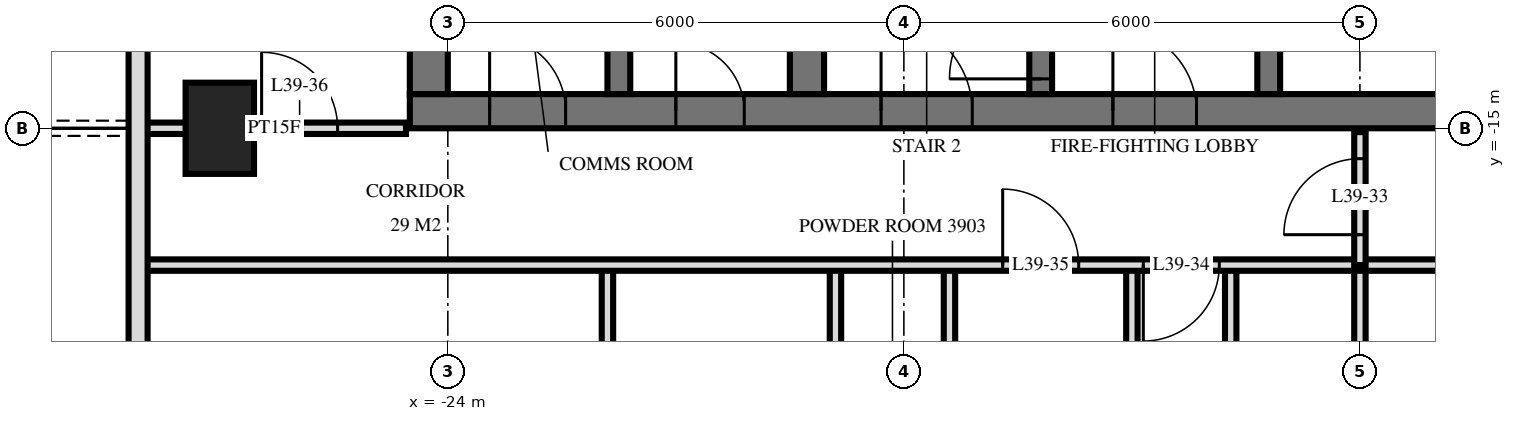
"""IFC4 building model, lengths in metres.
Left out: names, types, materials, properties, quantities, classifications, styles, units other than length and angle.
Written with IfcOpenShell. Run it as: python <this file> out.ifc"""

import sys

from ifc_helpers import new_model, si_unit, direction, frame, frame_2d, origin, origin_2d, place, context, subcontext, project, spatial, rectangle, extrude, element, fill, save


model = new_model("IFC4")
c1 = context("Model", 3, precision=1e-05, world=origin(), true_north=direction((0.0, 1.0)))
c2 = subcontext(c1, "Body", "Model", "MODEL_VIEW")
j1 = project(units=[si_unit("LENGTHUNIT", "METRE"), si_unit("PLANEANGLEUNIT", "RADIAN")], contexts=[c1])
p1 = place(None, origin())
s1 = spatial("IfcSite", under=j1, at=p1, CompositionType="ELEMENT")
p2 = place(p1, origin())
s2 = spatial("IfcBuilding", under=s1, at=p2, CompositionType="ELEMENT")
p3 = place(p2, frame((0.0, 0.0, 152.4)))
s3 = spatial("IfcBuildingStorey", under=s2, at=p3, CompositionType="ELEMENT", Elevation=152.4)
p4 = place(p3, frame((-27.0, -15.0, 0.0), z_axis=(0.0, 0.0, 1.0), x_axis=(0.0, 1.0, 0.0)))
e1 = element("IfcColumn", 1, at=p4, inside=s3, PredefinedType="COLUMN", context=c2, shape_type="SweptSolid", body=[
    extrude(rectangle(XDim=1.2, YDim=0.9, at=origin_2d()), origin(), (0.0, 0.0, 1.0), 3.6),
])
p5 = place(p3, frame((-24.5, -14.775, 0.0), z_axis=(0.0, 0.0, 1.0), x_axis=(1.0, 0.0, 0.0)))
e2 = element("IfcWall", 2, at=p5, inside=s3, PredefinedType="SHEAR", context=c2, shape_type="SweptSolid", body=[
    extrude(rectangle(XDim=14.5, YDim=0.45, at=frame_2d((7.25, 0.0))), origin(), (0.0, 0.0, 1.0), 3.6),
])
p6 = place(p5, frame((6.2, 0.0, 0.0)))
e3 = element("IfcOpeningElement", 3, at=p6, cuts=e2, PredefinedType="OPENING", context=c2, shape_type="SweptSolid", body=[
    extrude(rectangle(XDim=1.2, YDim=2.1, at=frame_2d((0.6, 1.05))), frame((0.0, 0.235, 0.0), z_axis=(0.0, -1.0, 0.0), x_axis=(1.0, 0.0, 0.0)), (0.0, 0.0, 1.0), 0.47),
])
p7 = place(p5, frame((9.25, 0.0, 0.0)))
e4 = element("IfcOpeningElement", 4, at=p7, cuts=e2, PredefinedType="OPENING", context=c2, shape_type="SweptSolid", body=[
    extrude(rectangle(XDim=1.1, YDim=2.1, at=frame_2d((0.55, 1.05))), frame((0.0, 0.235, 0.0), z_axis=(0.0, -1.0, 0.0), x_axis=(1.0, 0.0, 0.0)), (0.0, 0.0, 1.0), 0.47),
])
p8 = place(p5, frame((3.5, 0.0, 0.0)))
e5 = element("IfcOpeningElement", 5, at=p8, cuts=e2, PredefinedType="OPENING", context=c2, shape_type="SweptSolid", body=[
    extrude(rectangle(XDim=0.9, YDim=2.1, at=frame_2d((0.45, 1.05))), frame((0.0, 0.235, 0.0), z_axis=(0.0, -1.0, 0.0), x_axis=(1.0, 0.0, 0.0)), (0.0, 0.0, 1.0), 0.47),
])
p9 = place(p5, frame((1.05, 0.0, 0.0)))
e6 = element("IfcOpeningElement", 6, at=p9, cuts=e2, PredefinedType="OPENING", context=c2, shape_type="SweptSolid", body=[
    extrude(rectangle(XDim=1.0, YDim=2.1, at=frame_2d((0.5, 1.05))), frame((0.0, 0.235, 0.0), z_axis=(0.0, -1.0, 0.0), x_axis=(1.0, 0.0, 0.0)), (0.0, 0.0, 1.0), 0.47),
])
p10 = place(p3, frame((-24.25, -14.55, 0.0), z_axis=(0.0, 0.0, 1.0), x_axis=(0.0, 1.0, 0.0)))
e7 = element("IfcWall", 7, at=p10, inside=s3, PredefinedType="SHEAR", context=c2, shape_type="SweptSolid", body=[
    extrude(rectangle(XDim=14.1, YDim=0.5, at=frame_2d((7.05, 0.0))), origin(), (0.0, 0.0, 1.0), 3.6),
])
p11 = place(p3, frame((-13.2, -14.55, 0.0), z_axis=(0.0, 0.0, 1.0), x_axis=(0.0, 1.0, 0.0)))
e8 = element("IfcWall", 8, at=p11, inside=s3, PredefinedType="SHEAR", context=c2, shape_type="SweptSolid", body=[
    extrude(rectangle(XDim=5.4, YDim=0.3, at=frame_2d((2.7, 0.0))), origin(), (0.0, 0.0, 1.0), 3.6),
])
p12 = place(p11, frame((4.0, 0.0, 0.0)))
e9 = element("IfcOpeningElement", 9, at=p12, cuts=e8, PredefinedType="OPENING", context=c2, shape_type="SweptSolid", body=[
    extrude(rectangle(XDim=1.2, YDim=2.1, at=frame_2d((0.6, 1.05))), frame((0.0, 0.16, 0.0), z_axis=(0.0, -1.0, 0.0), x_axis=(1.0, 0.0, 0.0)), (0.0, 0.0, 1.0), 0.32),
])
p13 = place(p3, frame((-16.2, -14.55, 0.0), z_axis=(0.0, 0.0, 1.0), x_axis=(0.0, 1.0, 0.0)))
e10 = element("IfcWall", 10, at=p13, inside=s3, PredefinedType="SHEAR", context=c2, shape_type="SweptSolid", body=[
    extrude(rectangle(XDim=5.4, YDim=0.3, at=frame_2d((2.7, 0.0))), origin(), (0.0, 0.0, 1.0), 3.6),
])
p14 = place(p13, frame((0.2, 0.0, 0.0)))
e11 = element("IfcOpeningElement", 11, at=p14, cuts=e10, PredefinedType="OPENING", context=c2, shape_type="SweptSolid", body=[
    extrude(rectangle(XDim=1.2, YDim=2.1, at=frame_2d((0.6, 1.05))), frame((0.0, 0.16, 0.0), z_axis=(0.0, -1.0, 0.0), x_axis=(1.0, 0.0, 0.0)), (0.0, 0.0, 1.0), 0.32),
])
p15 = place(p3, frame((-19.275, -14.55, 0.0), z_axis=(0.0, 0.0, 1.0), x_axis=(0.0, 1.0, 0.0)))
e12 = element("IfcWall", 12, at=p15, inside=s3, PredefinedType="SHEAR", context=c2, shape_type="SweptSolid", body=[
    extrude(rectangle(XDim=5.4, YDim=0.45, at=frame_2d((2.7, 0.0))), origin(), (0.0, 0.0, 1.0), 3.6),
])
p16 = place(p3, frame((-21.75, -14.55, 0.0), z_axis=(0.0, 0.0, 1.0), x_axis=(0.0, 1.0, 0.0)))
e13 = element("IfcWall", 13, at=p16, inside=s3, PredefinedType="SHEAR", context=c2, shape_type="SweptSolid", body=[
    extrude(rectangle(XDim=5.4, YDim=0.3, at=frame_2d((2.7, 0.0))), origin(), (0.0, 0.0, 1.0), 3.6),
])
p17 = place(p3, frame((-28.075, -3.325, 0.0), z_axis=(0.0, 0.0, 1.0), x_axis=(0.0, -1.0, 0.0)))
e14 = element("IfcWall", 14, at=p17, inside=s3, PredefinedType="SOLIDWALL", context=c2, shape_type="SweptSolid", body=[
    extrude(rectangle(XDim=25.951, YDim=0.25, at=frame_2d((12.975, 0.0))), origin(), (0.0, 0.0, 1.0), 3.32),
])
p18 = place(p17, frame((7.275, 0.0, 0.0)))
e15 = element("IfcOpeningElement", 15, at=p18, cuts=e14, PredefinedType="OPENING", context=c2, shape_type="SweptSolid", body=[
    extrude(rectangle(XDim=1.8, YDim=2.4, at=frame_2d((0.9, 1.2))), frame((0.0, 0.135, 0.0), z_axis=(0.0, -1.0, 0.0), x_axis=(1.0, 0.0, 0.0)), (0.0, 0.0, 1.0), 0.27),
])
p19 = place(p17, frame((18.175, 0.0, 0.0)))
e16 = element("IfcOpeningElement", 16, at=p19, cuts=e14, PredefinedType="OPENING", context=c2, shape_type="SweptSolid", body=[
    extrude(rectangle(XDim=1.8, YDim=2.4, at=frame_2d((0.9, 1.2))), frame((0.0, 0.135, 0.0), z_axis=(0.0, -1.0, 0.0), x_axis=(1.0, 0.0, 0.0)), (0.0, 0.0, 1.0), 0.27),
])
p20 = place(p17, frame((21.075, 0.0, 0.0)))
e17 = element("IfcOpeningElement", 17, at=p20, cuts=e14, PredefinedType="OPENING", context=c2, shape_type="SweptSolid", body=[
    extrude(rectangle(XDim=1.8, YDim=2.4, at=frame_2d((0.9, 1.2))), frame((0.0, 0.135, 0.0), z_axis=(0.0, -1.0, 0.0), x_axis=(1.0, 0.0, 0.0)), (0.0, 0.0, 1.0), 0.27),
])
p21 = place(p17, frame((23.825, 0.0, 0.3)))
e18 = element("IfcOpeningElement", 18, at=p21, cuts=e14, PredefinedType="OPENING", context=c2, shape_type="SweptSolid", body=[
    extrude(rectangle(XDim=1.8, YDim=2.1, at=frame_2d((0.9, 1.05))), frame((0.0, 0.135, 0.0), z_axis=(0.0, -1.0, 0.0), x_axis=(1.0, 0.0, 0.0)), (0.0, 0.0, 1.0), 0.27),
])
p22 = place(p3, frame((-12.0, -16.8, 0.0), z_axis=(0.0, 0.0, 1.0), x_axis=(0.0, 1.0, 0.0)))
e19 = element("IfcWall", 19, at=p22, inside=s3, PredefinedType="PARTITIONING", context=c2, shape_type="SweptSolid", body=[
    extrude(rectangle(XDim=1.75, YDim=0.15, at=frame_2d((0.875, 0.0))), origin(), (0.0, 0.0, 1.0), 3.32),
])
p23 = place(p22, frame((0.4, 0.0, 0.0)))
e20 = element("IfcOpeningElement", 20, at=p23, cuts=e19, PredefinedType="OPENING", context=c2, shape_type="SweptSolid", body=[
    extrude(rectangle(XDim=1.0, YDim=2.1, at=frame_2d((0.5, 1.05))), frame((0.0, 0.085, 0.0), z_axis=(0.0, -1.0, 0.0), x_axis=(1.0, 0.0, 0.0)), (0.0, 0.0, 1.0), 0.17),
])
p24 = place(p3, frame((-12.0, -33.62, 0.0), z_axis=(0.0, 0.0, 1.0), x_axis=(0.0, 1.0, 0.0)))
e21 = element("IfcWall", 21, at=p24, inside=s3, PredefinedType="PARTITIONING", context=c2, shape_type="SweptSolid", body=[
    extrude(rectangle(XDim=16.82, YDim=0.15, at=frame_2d((8.41, 0.0))), origin(), (0.0, 0.0, 1.0), 3.32),
])
p25 = place(p3, frame((-13.7, -21.8, 0.0), z_axis=(0.0, 0.0, 1.0), x_axis=(0.0, 1.0, 0.0)))
e22 = element("IfcWall", 22, at=p25, inside=s3, PredefinedType="PARTITIONING", context=c2, shape_type="SweptSolid", body=[
    extrude(rectangle(XDim=5.0, YDim=0.15, at=frame_2d((2.5, 0.0))), origin(), (0.0, 0.0, 1.0), 3.32),
])
p26 = place(p25, frame((2.1, 0.0, 0.0)))
e23 = element("IfcOpeningElement", 23, at=p26, cuts=e22, PredefinedType="OPENING", context=c2, shape_type="SweptSolid", body=[
    extrude(rectangle(XDim=0.8, YDim=2.1, at=frame_2d((0.4, 1.05))), frame((0.0, 0.085, 0.0), z_axis=(0.0, -1.0, 0.0), x_axis=(1.0, 0.0, 0.0)), (0.0, 0.0, 1.0), 0.17),
])
p27 = place(p3, frame((-15.0, -21.0, 0.0), z_axis=(0.0, 0.0, 1.0), x_axis=(0.0, 1.0, 0.0)))
e24 = element("IfcWall", 24, at=p27, inside=s3, PredefinedType="PARTITIONING", context=c2, shape_type="SweptSolid", body=[
    extrude(rectangle(XDim=4.2, YDim=0.15, at=frame_2d((2.1, 0.0))), origin(), (0.0, 0.0, 1.0), 3.32),
])
p28 = place(p3, frame((-17.4, -21.0, 0.0), z_axis=(0.0, 0.0, 1.0), x_axis=(0.0, 1.0, 0.0)))
e25 = element("IfcWall", 25, at=p28, inside=s3, PredefinedType="PARTITIONING", context=c2, shape_type="SweptSolid", body=[
    extrude(rectangle(XDim=4.2, YDim=0.15, at=frame_2d((2.1, 0.0))), origin(), (0.0, 0.0, 1.0), 3.32),
])
p29 = place(p28, frame((1.6, 0.0, 0.0)))
e26 = element("IfcOpeningElement", 26, at=p29, cuts=e25, PredefinedType="OPENING", context=c2, shape_type="SweptSolid", body=[
    extrude(rectangle(XDim=1.0, YDim=2.1, at=frame_2d((0.5, 1.05))), frame((0.0, 0.085, 0.0), z_axis=(0.0, -1.0, 0.0), x_axis=(1.0, 0.0, 0.0)), (0.0, 0.0, 1.0), 0.17),
])
p30 = place(p3, frame((-18.9, -21.0, 0.0), z_axis=(0.0, 0.0, 1.0), x_axis=(0.0, 1.0, 0.0)))
e27 = element("IfcWall", 27, at=p30, inside=s3, PredefinedType="PLUMBINGWALL", context=c2, shape_type="SweptSolid", body=[
    extrude(rectangle(XDim=4.2, YDim=0.15, at=frame_2d((2.1, 0.0))), origin(), (0.0, 0.0, 1.0), 3.32),
])
p31 = place(p3, frame((-21.9, -21.0, 0.0), z_axis=(0.0, 0.0, 1.0), x_axis=(0.0, 1.0, 0.0)))
e28 = element("IfcWall", 28, at=p31, inside=s3, PredefinedType="PARTITIONING", context=c2, shape_type="SweptSolid", body=[
    extrude(rectangle(XDim=4.2, YDim=0.15, at=frame_2d((2.1, 0.0))), origin(), (0.0, 0.0, 1.0), 3.32),
])
p32 = place(p3, frame((-28.02, -16.8, 0.0), z_axis=(0.0, 0.0, 1.0), x_axis=(1.0, 0.0, 0.0)))
e29 = element("IfcWall", 29, at=p32, inside=s3, PredefinedType="PARTITIONING", context=c2, shape_type="SweptSolid", body=[
    extrude(rectangle(XDim=56.04, YDim=0.15, at=frame_2d((28.02, 0.0))), origin(), (0.0, 0.0, 1.0), 3.32),
])
p33 = place(p32, frame((13.17, 0.0, 0.0)))
e30 = element("IfcOpeningElement", 30, at=p33, cuts=e29, PredefinedType="OPENING", context=c2, shape_type="SweptSolid", body=[
    extrude(rectangle(XDim=1.0, YDim=2.1, at=frame_2d((0.5, 1.05))), frame((0.0, 0.085, 0.0), z_axis=(0.0, -1.0, 0.0), x_axis=(1.0, 0.0, 0.0)), (0.0, 0.0, 1.0), 0.17),
])
p34 = place(p32, frame((11.32, 0.0, 0.0)))
e31 = element("IfcOpeningElement", 31, at=p34, cuts=e29, PredefinedType="OPENING", context=c2, shape_type="SweptSolid", body=[
    extrude(rectangle(XDim=1.0, YDim=2.1, at=frame_2d((0.5, 1.05))), frame((0.0, 0.085, 0.0), z_axis=(0.0, -1.0, 0.0), x_axis=(1.0, 0.0, 0.0)), (0.0, 0.0, 1.0), 0.17),
])
p35 = place(p32, frame((41.87, 0.0, 0.0)))
e32 = element("IfcOpeningElement", 32, at=p35, cuts=e29, PredefinedType="OPENING", context=c2, shape_type="SweptSolid", body=[
    extrude(rectangle(XDim=1.0, YDim=2.1, at=frame_2d((0.5, 1.05))), frame((0.0, 0.085, 0.0), z_axis=(0.0, -1.0, 0.0), x_axis=(1.0, 0.0, 0.0)), (0.0, 0.0, 1.0), 0.17),
])
p36 = place(p32, frame((43.72, 0.0, 0.0)))
e33 = element("IfcOpeningElement", 33, at=p36, cuts=e29, PredefinedType="OPENING", context=c2, shape_type="SweptSolid", body=[
    extrude(rectangle(XDim=1.0, YDim=2.1, at=frame_2d((0.5, 1.05))), frame((0.0, 0.085, 0.0), z_axis=(0.0, -1.0, 0.0), x_axis=(1.0, 0.0, 0.0)), (0.0, 0.0, 1.0), 0.17),
])
p37 = place(p32, frame((19.52, 0.0, 0.0)))
e34 = element("IfcOpeningElement", 34, at=p37, cuts=e29, PredefinedType="OPENING", context=c2, shape_type="SweptSolid", body=[
    extrude(rectangle(XDim=1.0, YDim=2.1, at=frame_2d((0.5, 1.05))), frame((0.0, 0.085, 0.0), z_axis=(0.0, -1.0, 0.0), x_axis=(1.0, 0.0, 0.0)), (0.0, 0.0, 1.0), 0.17),
])
p38 = place(p32, frame((27.52, 0.0, 0.0)))
e35 = element("IfcOpeningElement", 35, at=p38, cuts=e29, PredefinedType="OPENING", context=c2, shape_type="SweptSolid", body=[
    extrude(rectangle(XDim=1.0, YDim=2.1, at=frame_2d((0.5, 1.05))), frame((0.0, 0.085, 0.0), z_axis=(0.0, -1.0, 0.0), x_axis=(1.0, 0.0, 0.0)), (0.0, 0.0, 1.0), 0.17),
])
p39 = place(p32, frame((35.52, 0.0, 0.0)))
e36 = element("IfcOpeningElement", 36, at=p39, cuts=e29, PredefinedType="OPENING", context=c2, shape_type="SweptSolid", body=[
    extrude(rectangle(XDim=1.0, YDim=2.1, at=frame_2d((0.5, 1.05))), frame((0.0, 0.085, 0.0), z_axis=(0.0, -1.0, 0.0), x_axis=(1.0, 0.0, 0.0)), (0.0, 0.0, 1.0), 0.17),
])
p40 = place(p3, frame((-28.02, -15.0, 0.0), z_axis=(0.0, 0.0, 1.0), x_axis=(1.0, 0.0, 0.0)))
e37 = element("IfcWall", 37, at=p40, inside=s3, PredefinedType="PARTITIONING", context=c2, shape_type="SweptSolid", body=[
    extrude(rectangle(XDim=3.47, YDim=0.15, at=frame_2d((1.735, 0.0))), origin(), (0.0, 0.0, 1.0), 3.32),
])
p41 = place(p40, frame((1.57, 0.0, 0.0)))
e38 = element("IfcOpeningElement", 38, at=p41, cuts=e37, PredefinedType="OPENING", context=c2, shape_type="SweptSolid", body=[
    extrude(rectangle(XDim=1.0, YDim=2.1, at=frame_2d((0.5, 1.05))), frame((0.0, 0.085, 0.0), z_axis=(0.0, -1.0, 0.0), x_axis=(1.0, 0.0, 0.0)), (0.0, 0.0, 1.0), 0.17),
])
p42 = place(p6, origin())
e39 = element("IfcDoor", 39, at=p42, inside=s3, OperationType="SINGLE_SWING_RIGHT", PredefinedType="DOOR", context=c2, shape_type="SweptSolid", body=[
    extrude(rectangle(XDim=1.2, YDim=2.1, at=frame_2d((0.6, 1.05))), frame((0.0, 0.025, 0.0), z_axis=(0.0, -1.0, 0.0), x_axis=(1.0, 0.0, 0.0)), (0.0, 0.0, 1.0), 0.05),
])
fill(e3, e39)
p43 = place(p7, origin())
e40 = element("IfcDoor", 40, at=p43, inside=s3, OperationType="SINGLE_SWING_RIGHT", PredefinedType="DOOR", context=c2, shape_type="SweptSolid", body=[
    extrude(rectangle(XDim=1.1, YDim=2.1, at=frame_2d((0.55, 1.05))), frame((0.0, 0.025, 0.0), z_axis=(0.0, -1.0, 0.0), x_axis=(1.0, 0.0, 0.0)), (0.0, 0.0, 1.0), 0.05),
])
fill(e4, e40)
p44 = place(p8, origin())
e41 = element("IfcDoor", 41, at=p44, inside=s3, OperationType="SINGLE_SWING_RIGHT", PredefinedType="DOOR", context=c2, shape_type="SweptSolid", body=[
    extrude(rectangle(XDim=0.9, YDim=2.1, at=frame_2d((0.45, 1.05))), frame((0.0, 0.025, 0.0), z_axis=(0.0, -1.0, 0.0), x_axis=(1.0, 0.0, 0.0)), (0.0, 0.0, 1.0), 0.05),
])
fill(e5, e41)
p45 = place(p9, origin())
e42 = element("IfcDoor", 42, at=p45, inside=s3, OperationType="SINGLE_SWING_RIGHT", PredefinedType="DOOR", context=c2, shape_type="SweptSolid", body=[
    extrude(rectangle(XDim=1.0, YDim=2.1, at=frame_2d((0.5, 1.05))), frame((0.0, 0.025, 0.0), z_axis=(0.0, -1.0, 0.0), x_axis=(1.0, 0.0, 0.0)), (0.0, 0.0, 1.0), 0.05),
])
fill(e6, e42)
p46 = place(p14, origin())
e43 = element("IfcDoor", 43, at=p46, inside=s3, OperationType="SINGLE_SWING_RIGHT", PredefinedType="DOOR", context=c2, shape_type="SweptSolid", body=[
    extrude(rectangle(XDim=1.2, YDim=2.1, at=frame_2d((0.6, 1.05))), frame((0.0, 0.025, 0.0), z_axis=(0.0, -1.0, 0.0), x_axis=(1.0, 0.0, 0.0)), (0.0, 0.0, 1.0), 0.05),
])
fill(e11, e43)
p47 = place(p23, origin())
e44 = element("IfcDoor", 44, at=p47, inside=s3, OperationType="SINGLE_SWING_RIGHT", PredefinedType="DOOR", context=c2, shape_type="SweptSolid", body=[
    extrude(rectangle(XDim=1.0, YDim=2.1, at=frame_2d((0.5, 1.05))), frame((0.0, 0.025, 0.0), z_axis=(0.0, -1.0, 0.0), x_axis=(1.0, 0.0, 0.0)), (0.0, 0.0, 1.0), 0.05),
])
fill(e20, e44)
p48 = place(p33, frame((0.5, 0.0, 0.0), z_axis=(0.0, 0.0, 1.0), x_axis=(-1.0, 0.0, 0.0)))
e45 = element("IfcDoor", 45, at=p48, inside=s3, OperationType="SINGLE_SWING_LEFT", PredefinedType="DOOR", context=c2, shape_type="SweptSolid", body=[
    extrude(rectangle(XDim=1.0, YDim=2.1, at=frame_2d((0.0, 1.05))), frame((0.0, -0.025, 0.0), z_axis=(0.0, 1.0, 0.0), x_axis=(-1.0, 0.0, 0.0)), (0.0, 0.0, 1.0), 0.05),
])
fill(e30, e45)
p49 = place(p34, origin())
e46 = element("IfcDoor", 46, at=p49, inside=s3, OperationType="SINGLE_SWING_RIGHT", PredefinedType="DOOR", context=c2, shape_type="SweptSolid", body=[
    extrude(rectangle(XDim=1.0, YDim=2.1, at=frame_2d((0.5, 1.05))), frame((0.0, 0.025, 0.0), z_axis=(0.0, -1.0, 0.0), x_axis=(1.0, 0.0, 0.0)), (0.0, 0.0, 1.0), 0.05),
])
fill(e31, e46)
p50 = place(p41, origin())
e47 = element("IfcDoor", 47, at=p50, inside=s3, OperationType="SINGLE_SWING_RIGHT", PredefinedType="DOOR", context=c2, shape_type="SweptSolid", body=[
    extrude(rectangle(XDim=1.0, YDim=2.1, at=frame_2d((0.5, 1.05))), frame((0.0, 0.025, 0.0), z_axis=(0.0, -1.0, 0.0), x_axis=(1.0, 0.0, 0.0)), (0.0, 0.0, 1.0), 0.05),
])
fill(e38, e47)
save(model, sys.argv[1])
